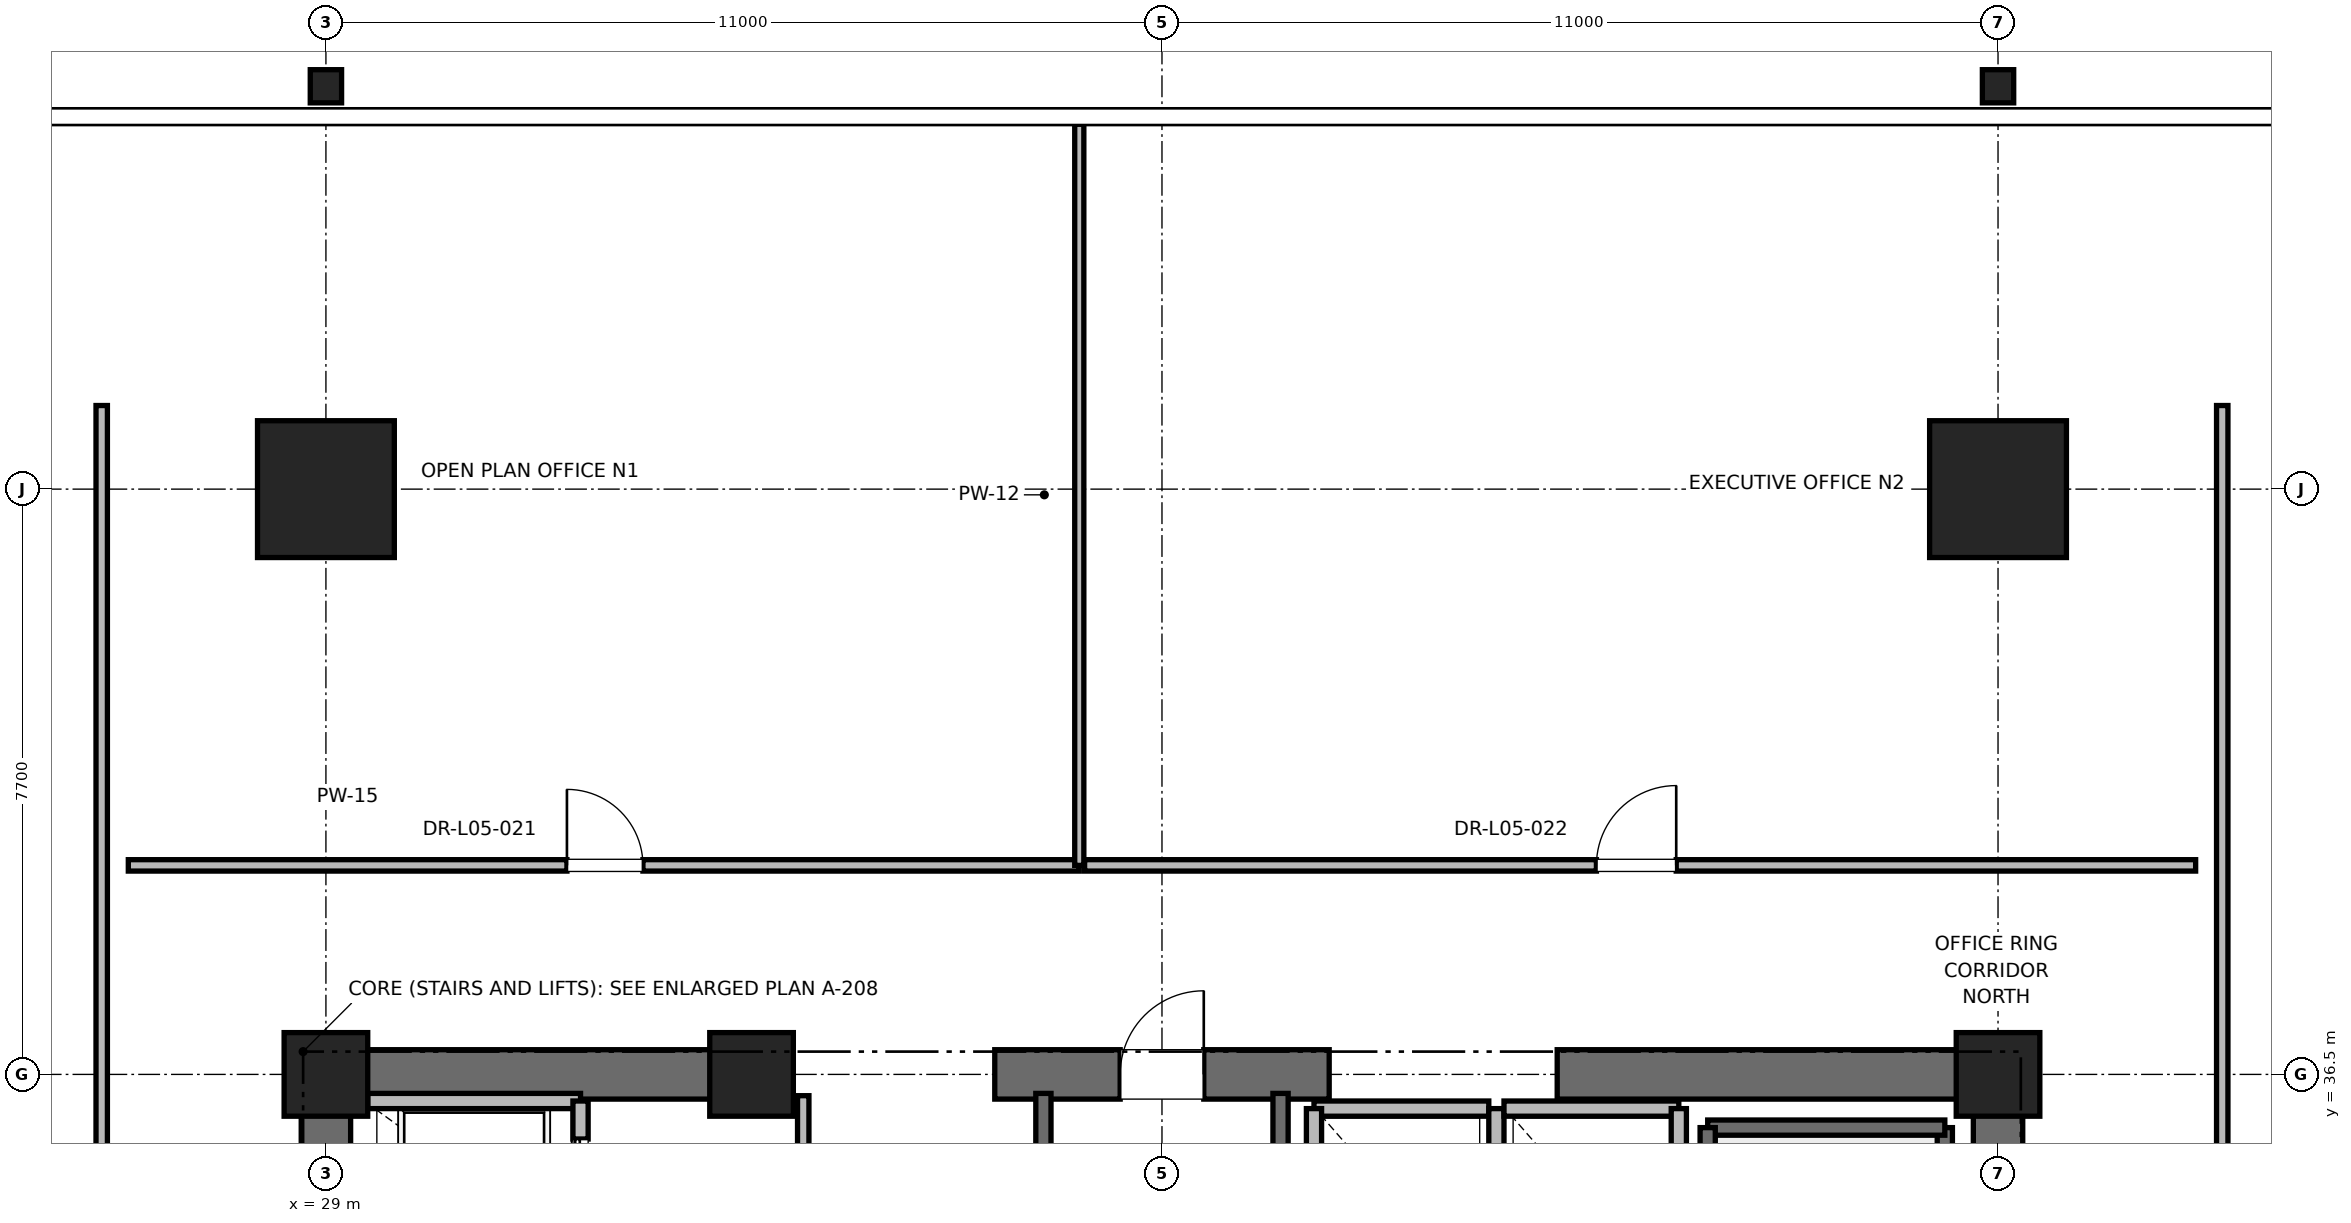
"""IFC4 building model, lengths in metres.
Left out: names, types, materials, properties, quantities, classifications, styles, units other than length and angle.
Written with IfcOpenShell. Run it as: python <this file> out.ifc"""

import sys

from ifc_helpers import new_model, si_unit, direction, frame, frame_2d, origin, origin_2d, place, context, subcontext, project, spatial, rectangle, i_section, extrude, element, fill, save


model = new_model("IFC4")
c1 = context("Model", 3, precision=1e-05, world=origin(), true_north=direction((0.0, 1.0)))
c2 = subcontext(c1, "Body", "Model", "MODEL_VIEW")
j1 = project(units=[si_unit("LENGTHUNIT", "METRE"), si_unit("PLANEANGLEUNIT", "RADIAN")], contexts=[c1])
p1 = place(None, origin())
s1 = spatial("IfcSite", under=j1, at=p1, CompositionType="ELEMENT")
p2 = place(p1, origin())
s2 = spatial("IfcBuilding", under=s1, at=p2, CompositionType="ELEMENT")
p3 = place(p2, frame((0.0, 0.0, 27.6)))
s3 = spatial("IfcBuildingStorey", under=s2, at=p3, CompositionType="ELEMENT", Elevation=27.6)
for number, where, z_axis, x_axis in (
    (1, (29.0, 44.2, 0.0), (0.0, 0.0, 1.0), (1.0, 0.0, 0.0)),
    (2, (51.0, 44.2, 0.0), (0.0, 0.0, 1.0), (1.0, 0.0, 0.0)),
):
    element("IfcColumn", number, at=place(p3, frame(where, z_axis=z_axis, x_axis=x_axis)), inside=s3, PredefinedType="COLUMN", context=c2, shape_type="SweptSolid", body=[
        extrude(rectangle(XDim=1.8, YDim=1.8, at=origin_2d()), origin(), (0.0, 0.0, 1.0), 4.0),
    ])
for number, where, z_axis, x_axis in (
    (3, (29.0, 49.5, 0.0), (0.0, 0.0, 1.0), (1.0, 0.0, 0.0)),
    (4, (51.0, 49.5, 0.0), (0.0, 0.0, 1.0), (1.0, 0.0, 0.0)),
):
    element("IfcColumn", number, at=place(p3, frame(where, z_axis=z_axis, x_axis=x_axis)), inside=s3, PredefinedType="COLUMN", context=c2, shape_type="SweptSolid", body=[
        extrude(i_section(OverallWidth=0.412, OverallDepth=0.437, WebThickness=0.036, FlangeThickness=0.058, FilletRadius=0.015, at=origin_2d()), origin(), (0.0, 0.0, 1.0), 4.0),
    ])
for number, where, z_axis, x_axis in (
    (5, (29.0, 36.5, 0.0), (0.0, 0.0, 1.0), (1.0, 0.0, 0.0)),
    (6, (51.0, 36.5, 0.0), (0.0, 0.0, 1.0), (1.0, 0.0, 0.0)),
    (7, (34.6, 36.5, 0.0), (0.0, 0.0, 1.0), (1.0, 0.0, 0.0)),
):
    element("IfcColumn", number, at=place(p3, frame(where, z_axis=z_axis, x_axis=x_axis)), inside=s3, PredefinedType="PILASTER", context=c2, shape_type="SweptSolid", body=[
        extrude(rectangle(XDim=1.1, YDim=1.1, at=origin_2d()), origin(), (0.0, 0.0, 1.0), 4.0),
    ])
p4 = place(p3, frame((29.0, 36.5, 0.0), z_axis=(0.0, 0.0, 1.0), x_axis=(1.0, 0.0, 0.0)))
e8 = element("IfcWall", 8, at=p4, inside=s3, PredefinedType="SHEAR", context=c2, shape_type="SweptSolid", body=[
    extrude(rectangle(XDim=5.8, YDim=0.65, at=frame_2d((2.9, 0.0))), origin(), (0.0, 0.0, 1.0), 3.76),
])
p5 = place(p3, frame((37.8, 36.5, 0.0), z_axis=(0.0, 0.0, 1.0), x_axis=(1.0, 0.0, 0.0)))
e9 = element("IfcWall", 9, at=p5, inside=s3, PredefinedType="SHEAR", context=c2, shape_type="SweptSolid", body=[
    extrude(rectangle(XDim=4.4, YDim=0.65, at=frame_2d((2.2, 0.0))), origin(), (0.0, 0.0, 1.0), 3.76),
])
p6 = place(p5, frame((1.65, 0.0, 0.0)))
e10 = element("IfcOpeningElement", 10, at=p6, cuts=e9, PredefinedType="OPENING", context=c2, shape_type="SweptSolid", body=[
    extrude(rectangle(XDim=1.1, YDim=2.15, at=frame_2d((0.55, 1.075))), frame((0.0, 0.325, 0.0), z_axis=(0.0, -1.0, 0.0), x_axis=(1.0, 0.0, 0.0)), (0.0, 0.0, 1.0), 0.65),
])
for number, where, z_axis, x_axis in (
    (11, (45.2, 36.5, 0.0), (0.0, 0.0, 1.0), (1.0, 0.0, 0.0)),
    (12, (29.0, 30.7, 0.0), (0.0, 0.0, 1.0), (0.0, 1.0, 0.0)),
):
    element("IfcWall", number, at=place(p3, frame(where, z_axis=z_axis, x_axis=x_axis)), inside=s3, PredefinedType="SHEAR", context=c2, shape_type="SweptSolid", body=[
        extrude(rectangle(XDim=5.8, YDim=0.65, at=frame_2d((2.9, 0.0))), origin(), (0.0, 0.0, 1.0), 3.76),
    ])
p7 = place(p3, frame((51.0, 27.7, 0.0), z_axis=(0.0, 0.0, 1.0), x_axis=(0.0, 1.0, 0.0)))
e13 = element("IfcWall", 13, at=p7, inside=s3, PredefinedType="SHEAR", context=c2, shape_type="SweptSolid", body=[
    extrude(rectangle(XDim=8.8, YDim=0.65, at=frame_2d((4.4, 0.0))), origin(), (0.0, 0.0, 1.0), 3.76),
])
p8 = place(p3, frame((50.3, 27.65, 0.0), z_axis=(0.0, 0.0, 1.0), x_axis=(0.0, 1.0, 0.0)))
e14 = element("IfcWall", 14, at=p8, inside=s3, PredefinedType="SOLIDWALL", context=c2, shape_type="SweptSolid", body=[
    extrude(rectangle(XDim=8.15, YDim=0.2, at=frame_2d((4.075, 0.0))), origin(), (0.0, 0.0, 1.0), 3.76),
])
p9 = place(p3, frame((47.18, 35.8, 0.0), z_axis=(0.0, 0.0, 1.0), x_axis=(1.0, 0.0, 0.0)))
e15 = element("IfcWall", 15, at=p9, inside=s3, PredefinedType="SOLIDWALL", context=c2, shape_type="SweptSolid", body=[
    extrude(rectangle(XDim=3.12, YDim=0.2, at=frame_2d((1.56, 0.0))), origin(), (0.0, 0.0, 1.0), 3.76),
])
p10 = place(p3, frame((47.18, 27.62, 0.0), z_axis=(0.0, 0.0, 1.0), x_axis=(0.0, 1.0, 0.0)))
e16 = element("IfcWall", 16, at=p10, inside=s3, PredefinedType="SOLIDWALL", context=c2, shape_type="SweptSolid", body=[
    extrude(rectangle(XDim=8.18, YDim=0.2, at=frame_2d((4.09, 0.0))), origin(), (0.0, 0.0, 1.0), 3.76),
])
p11 = place(p3, frame((38.44, 27.38, 0.0), z_axis=(0.0, 0.0, 1.0), x_axis=(0.0, 1.0, 0.0)))
e17 = element("IfcWall", 17, at=p11, inside=s3, PredefinedType="SOLIDWALL", context=c2, shape_type="SweptSolid", body=[
    extrude(rectangle(XDim=8.87, YDim=0.2, at=frame_2d((4.435, 0.0))), origin(), (0.0, 0.0, 1.0), 3.76),
])
p12 = place(p3, frame((41.56, 27.68, 0.0), z_axis=(0.0, 0.0, 1.0), x_axis=(0.0, 1.0, 0.0)))
e18 = element("IfcWall", 18, at=p12, inside=s3, PredefinedType="SOLIDWALL", context=c2, shape_type="SweptSolid", body=[
    extrude(rectangle(XDim=8.57, YDim=0.2, at=frame_2d((4.285, 0.0))), origin(), (0.0, 0.0, 1.0), 3.76),
])
p13 = place(p3, frame((32.35, 36.15, 0.0), z_axis=(0.0, 0.0, 1.0), x_axis=(-1.0, 0.0, 0.0)))
e19 = element("IfcWall", 19, at=p13, inside=s3, PredefinedType="SOLIDWALL", context=c2, shape_type="SweptSolid", body=[
    extrude(rectangle(XDim=2.8, YDim=0.2, at=frame_2d((1.4, 0.0))), origin(), (0.0, 0.0, 1.0), 2.889),
])
p14 = place(p3, frame((32.35, 34.05, 0.0), z_axis=(0.0, 0.0, 1.0), x_axis=(0.0, 1.0, 0.0)))
e20 = element("IfcWall", 20, at=p14, inside=s3, PredefinedType="SOLIDWALL", context=c2, shape_type="SweptSolid", body=[
    extrude(rectangle(XDim=2.1, YDim=0.2, at=frame_2d((1.05, 0.0))), origin(), (0.0, 0.0, 1.0), 3.76),
])
p15 = place(p14, frame((0.5, 0.0, 0.0)))
e21 = element("IfcOpeningElement", 21, at=p15, cuts=e20, PredefinedType="OPENING", context=c2, shape_type="SweptSolid", body=[
    extrude(rectangle(XDim=1.1, YDim=2.2, at=frame_2d((0.55, 1.1))), frame((0.0, 0.1, 0.0), z_axis=(0.0, -1.0, 0.0), x_axis=(1.0, 0.0, 0.0)), (0.0, 0.0, 1.0), 0.2),
])
p16 = place(p3, frame((44.3, 36.05, 0.0), z_axis=(0.0, 0.0, 1.0), x_axis=(-1.0, 0.0, 0.0)))
e22 = element("IfcWall", 22, at=p16, inside=s3, PredefinedType="SOLIDWALL", context=c2, shape_type="SweptSolid", body=[
    extrude(rectangle(XDim=2.3, YDim=0.2, at=frame_2d((1.15, 0.0))), origin(), (0.0, 0.0, 1.0), 2.54),
])
for number, where, z_axis, x_axis in (
    (23, (42.0, 36.05, 0.0), (0.0, 0.0, 1.0), (0.0, -1.0, 0.0)),
    (24, (44.4, 33.45, 0.0), (0.0, 0.0, 1.0), (0.0, 1.0, 0.0)),
):
    element("IfcWall", number, at=place(p3, frame(where, z_axis=z_axis, x_axis=x_axis)), inside=s3, PredefinedType="SOLIDWALL", context=c2, shape_type="SweptSolid", body=[
        extrude(rectangle(XDim=2.6, YDim=0.2, at=frame_2d((1.3, 0.0))), origin(), (0.0, 0.0, 1.0), 2.54),
    ])
p17 = place(p3, frame((46.8, 36.05, 0.0), z_axis=(0.0, 0.0, 1.0), x_axis=(-1.0, 0.0, 0.0)))
e25 = element("IfcWall", 25, at=p17, inside=s3, PredefinedType="SOLIDWALL", context=c2, shape_type="SweptSolid", body=[
    extrude(rectangle(XDim=2.3, YDim=0.2, at=frame_2d((1.15, 0.0))), origin(), (0.0, 0.0, 1.0), 2.54),
])
p18 = place(p3, frame((46.8, 33.45, 0.0), z_axis=(0.0, 0.0, 1.0), x_axis=(0.0, 1.0, 0.0)))
e26 = element("IfcWall", 26, at=p18, inside=s3, PredefinedType="SOLIDWALL", context=c2, shape_type="SweptSolid", body=[
    extrude(rectangle(XDim=2.6, YDim=0.2, at=frame_2d((1.3, 0.0))), origin(), (0.0, 0.0, 1.0), 3.76),
])
p19 = place(p3, frame((35.28, 33.95, 0.0), z_axis=(0.0, 0.0, 1.0), x_axis=(0.0, 1.0, 0.0)))
e27 = element("IfcWall", 27, at=p19, inside=s3, PredefinedType="PARTITIONING", context=c2, shape_type="SweptSolid", body=[
    extrude(rectangle(XDim=2.27, YDim=0.15, at=frame_2d((1.135, 0.0))), origin(), (0.0, 0.0, 1.0), 2.54),
])
p20 = place(p19, frame((0.66, 0.0, 0.0)))
e28 = element("IfcOpeningElement", 28, at=p20, cuts=e27, PredefinedType="OPENING", context=c2, shape_type="SweptSolid", body=[
    extrude(rectangle(XDim=0.95, YDim=2.15, at=frame_2d((0.475, 1.075))), frame((0.0, 0.075, 0.0), z_axis=(0.0, -1.0, 0.0), x_axis=(1.0, 0.0, 0.0)), (0.0, 0.0, 1.0), 0.15),
])
p21 = place(p3, frame((26.4, 39.25, 0.0), z_axis=(0.0, 0.0, 1.0), x_axis=(1.0, 0.0, 0.0)))
e29 = element("IfcWall", 29, at=p21, inside=s3, PredefinedType="PARTITIONING", context=c2, shape_type="SweptSolid", body=[
    extrude(rectangle(XDim=12.512, YDim=0.15, at=frame_2d((6.256, 0.0))), origin(), (0.0, 0.0, 1.0), 2.85),
])
p22 = place(p21, frame((5.771, 0.0, 0.0)))
e30 = element("IfcOpeningElement", 30, at=p22, cuts=e29, PredefinedType="OPENING", context=c2, shape_type="SweptSolid", body=[
    extrude(rectangle(XDim=1.0, YDim=2.15, at=frame_2d((0.5, 1.075))), frame((0.0, 0.075, 0.0), z_axis=(0.0, -1.0, 0.0), x_axis=(1.0, 0.0, 0.0)), (0.0, 0.0, 1.0), 0.15),
])
p23 = place(p3, frame((38.912, 39.25, 0.0), z_axis=(0.0, 0.0, 1.0), x_axis=(0.0, 1.0, 0.0)))
e31 = element("IfcWall", 31, at=p23, inside=s3, PredefinedType="PARTITIONING", context=c2, shape_type="SweptSolid", body=[
    extrude(rectangle(XDim=9.75, YDim=0.12, at=frame_2d((4.875, 0.0))), origin(), (0.0, 0.0, 1.0), 2.39),
])
p24 = place(p3, frame((38.982, 39.25, 0.0), z_axis=(0.0, 0.0, 1.0), x_axis=(1.0, 0.0, 0.0)))
e32 = element("IfcWall", 32, at=p24, inside=s3, PredefinedType="PARTITIONING", context=c2, shape_type="SweptSolid", body=[
    extrude(rectangle(XDim=14.618, YDim=0.15, at=frame_2d((7.309, 0.0))), origin(), (0.0, 0.0, 1.0), 2.85),
])
p25 = place(p24, frame((6.734, 0.0, 0.0)))
e33 = element("IfcOpeningElement", 33, at=p25, cuts=e32, PredefinedType="OPENING", context=c2, shape_type="SweptSolid", body=[
    extrude(rectangle(XDim=1.05, YDim=2.2, at=frame_2d((0.525, 1.1))), frame((0.0, 0.075, 0.0), z_axis=(0.0, -1.0, 0.0), x_axis=(1.0, 0.0, 0.0)), (0.0, 0.0, 1.0), 0.15),
])
p26 = place(p3, frame((26.05, 9.7, 0.0), z_axis=(0.0, 0.0, 1.0), x_axis=(0.0, 1.0, 0.0)))
e34 = element("IfcWall", 34, at=p26, inside=s3, PredefinedType="PARTITIONING", context=c2, shape_type="SweptSolid", body=[
    extrude(rectangle(XDim=35.6, YDim=0.15, at=frame_2d((17.8, 0.0))), origin(), (0.0, 0.0, 1.0), 2.85),
])
p27 = place(p26, frame((17.3, 0.0, 0.0)))
e35 = element("IfcOpeningElement", 35, at=p27, cuts=e34, PredefinedType="OPENING", context=c2, shape_type="SweptSolid", body=[
    extrude(rectangle(XDim=1.0, YDim=2.15, at=frame_2d((0.5, 1.075))), frame((0.0, 0.075, 0.0), z_axis=(0.0, -1.0, 0.0), x_axis=(1.0, 0.0, 0.0)), (0.0, 0.0, 1.0), 0.15),
])
p28 = place(p3, frame((53.95, 24.722, 0.0), z_axis=(0.0, 0.0, 1.0), x_axis=(0.0, 1.0, 0.0)))
e36 = element("IfcWall", 36, at=p28, inside=s3, PredefinedType="PARTITIONING", context=c2, shape_type="SweptSolid", body=[
    extrude(rectangle(XDim=20.578, YDim=0.15, at=frame_2d((10.289, 0.0))), origin(), (0.0, 0.0, 1.0), 2.85),
])
p29 = place(p28, frame((5.339, 0.0, 0.0)))
e37 = element("IfcOpeningElement", 37, at=p29, cuts=e36, PredefinedType="OPENING", context=c2, shape_type="SweptSolid", body=[
    extrude(rectangle(XDim=1.0, YDim=2.15, at=frame_2d((0.5, 1.075))), frame((0.0, 0.075, 0.0), z_axis=(0.0, -1.0, 0.0), x_axis=(1.0, 0.0, 0.0)), (0.0, 0.0, 1.0), 0.15),
])
p30 = place(p6, origin())
e38 = element("IfcDoor", 38, at=p30, inside=s3, OperationType="SINGLE_SWING_RIGHT", PredefinedType="DOOR", context=c2, shape_type="SweptSolid", body=[
    extrude(rectangle(XDim=1.1, YDim=2.15, at=frame_2d((0.55, 1.075))), frame((0.0, 0.025, 0.0), z_axis=(0.0, -1.0, 0.0), x_axis=(1.0, 0.0, 0.0)), (0.0, 0.0, 1.0), 0.05),
])
fill(e10, e38)
p31 = place(p15, origin())
e39 = element("IfcDoor", 39, at=p31, inside=s3, OperationType="SLIDING_TO_RIGHT", PredefinedType="DOOR", context=c2, shape_type="SweptSolid", body=[
    extrude(rectangle(XDim=1.1, YDim=2.2, at=frame_2d((0.55, 1.1))), frame((0.0, 0.025, 0.0), z_axis=(0.0, -1.0, 0.0), x_axis=(1.0, 0.0, 0.0)), (0.0, 0.0, 1.0), 0.05),
])
fill(e21, e39)
p32 = place(p22, origin())
e40 = element("IfcDoor", 40, at=p32, inside=s3, OperationType="SINGLE_SWING_LEFT", PredefinedType="DOOR", context=c2, shape_type="SweptSolid", body=[
    extrude(rectangle(XDim=1.0, YDim=2.15, at=frame_2d((0.5, 1.075))), frame((0.0, 0.025, 0.0), z_axis=(0.0, -1.0, 0.0), x_axis=(1.0, 0.0, 0.0)), (0.0, 0.0, 1.0), 0.05),
])
fill(e30, e40)
p33 = place(p25, origin())
e41 = element("IfcDoor", 41, at=p33, inside=s3, OperationType="SINGLE_SWING_RIGHT", PredefinedType="DOOR", context=c2, shape_type="SweptSolid", body=[
    extrude(rectangle(XDim=1.05, YDim=2.2, at=frame_2d((0.525, 1.1))), frame((0.0, 0.025, 0.0), z_axis=(0.0, -1.0, 0.0), x_axis=(1.0, 0.0, 0.0)), (0.0, 0.0, 1.0), 0.05),
])
fill(e33, e41)
save(model, sys.argv[1])
